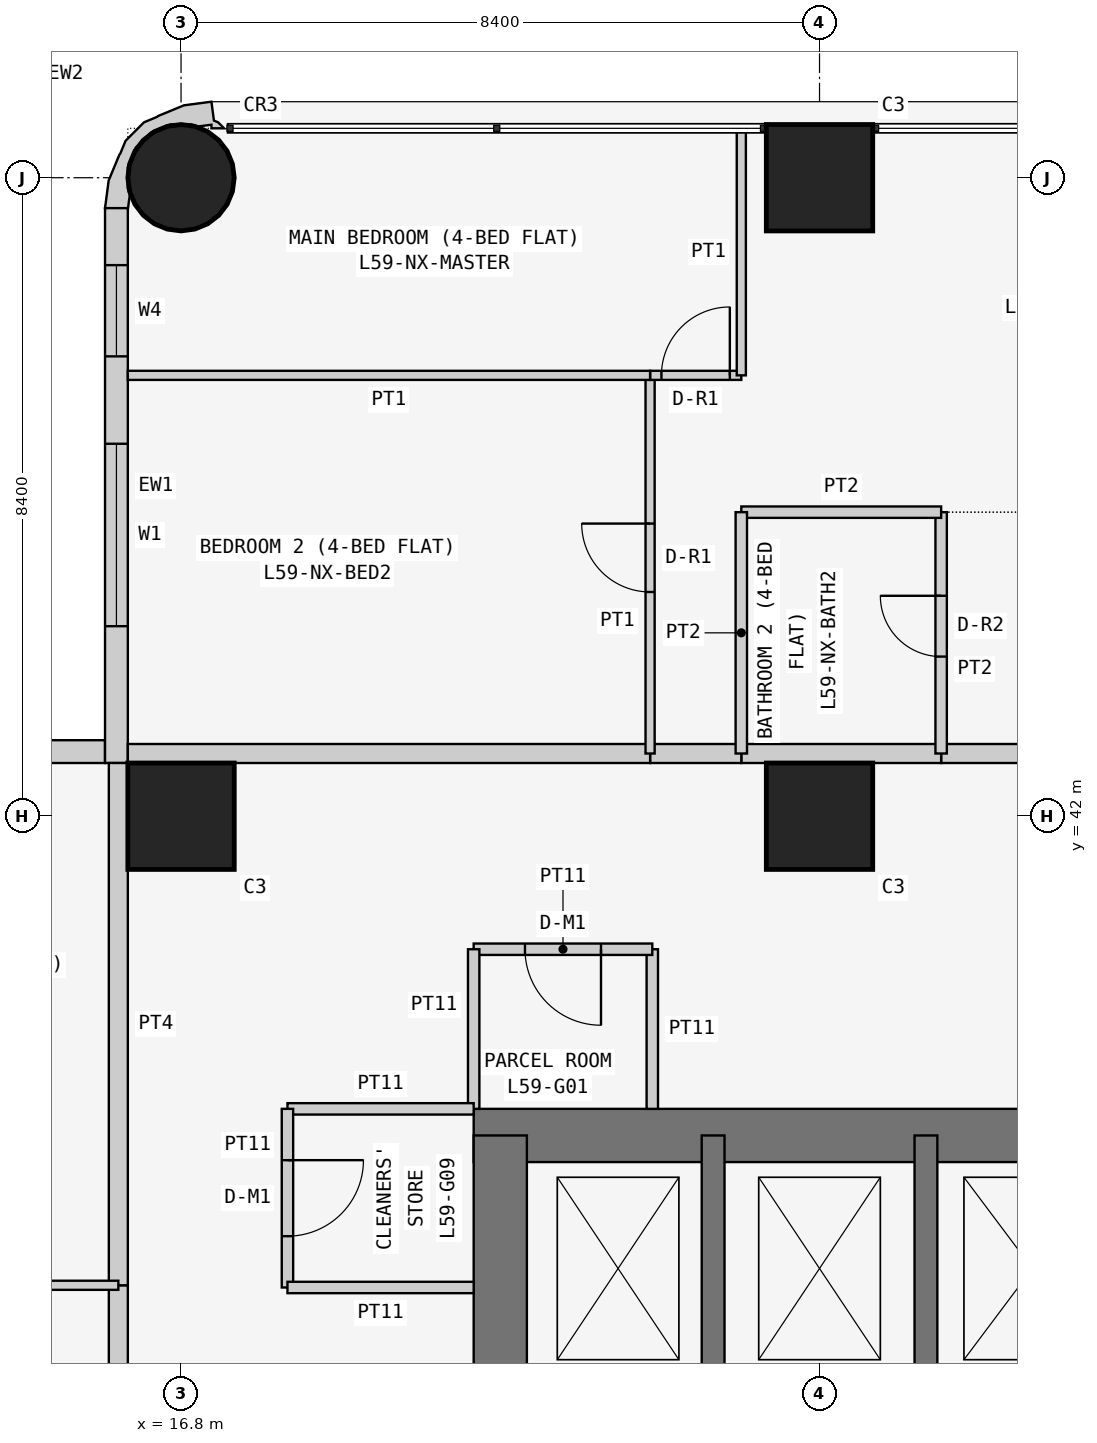
"""IFC4 building model, lengths in metres.
Left out: names, types, materials, properties, quantities, classifications, styles, units other than length and angle.
Written with IfcOpenShell. Run it as: python <this file> out.ifc"""

import sys

from ifc_helpers import new_model, si_unit, direction, frame, frame_2d, origin, origin_2d, place, context, subcontext, project, spatial, polyline, rectangle, circle, outline, extrude, element, fill, save


model = new_model("IFC4")
c1 = context("Model", 3, precision=1e-05, world=origin(), true_north=direction((0.0, 1.0)))
c2 = subcontext(c1, "Body", "Model", "MODEL_VIEW")
j1 = project(units=[si_unit("LENGTHUNIT", "METRE"), si_unit("PLANEANGLEUNIT", "RADIAN")], contexts=[c1])
p1 = place(None, origin())
s1 = spatial("IfcSite", under=j1, at=p1, CompositionType="ELEMENT")
p2 = place(p1, origin())
s2 = spatial("IfcBuilding", under=s1, at=p2, CompositionType="ELEMENT")
p3 = place(p2, frame((0.0, 0.0, 226.5)))
s3 = spatial("IfcBuildingStorey", under=s2, at=p3, CompositionType="ELEMENT", Elevation=226.5)
p4 = place(p3, frame((16.8, 42.0, 0.0), z_axis=(0.0, 0.0, 1.0), x_axis=(1.0, 0.0, 0.0)))
e1 = element("IfcColumn", 1, at=p4, inside=s3, PredefinedType="COLUMN", context=c2, shape_type="SweptSolid", body=[
    extrude(rectangle(XDim=1.4, YDim=1.4, at=origin_2d()), origin(), (0.0, 0.0, 1.0), 3.6),
])
p5 = place(p3, frame((16.8, 50.4, 0.0), z_axis=(0.0, 0.0, 1.0), x_axis=(1.0, 0.0, 0.0)))
e2 = element("IfcColumn", 2, at=p5, inside=s3, PredefinedType="COLUMN", context=c2, shape_type="SweptSolid", body=[
    extrude(circle(Radius=0.7, at=origin_2d()), origin(), (0.0, 0.0, 1.0), 3.6),
])
for number, where, z_axis, x_axis in (
    (3, (25.2, 42.0, 0.0), (0.0, 0.0, 1.0), (1.0, 0.0, 0.0)),
    (4, (25.2, 50.4, 0.0), (0.0, 0.0, 1.0), (1.0, 0.0, 0.0)),
):
    element("IfcColumn", number, at=place(p3, frame(where, z_axis=z_axis, x_axis=x_axis)), inside=s3, PredefinedType="COLUMN", context=c2, shape_type="SweptSolid", body=[
        extrude(rectangle(XDim=1.4, YDim=1.4, at=origin_2d()), origin(), (0.0, 0.0, 1.0), 3.6),
    ])
p6 = place(p3, frame((37.8, 37.8, 0.0), z_axis=(0.0, 0.0, 1.0), x_axis=(-1.0, 0.0, 0.0)))
e5 = element("IfcWall", 5, at=p6, inside=s3, PredefinedType="SHEAR", context=c2, shape_type="SweptSolid", body=[
    extrude(rectangle(XDim=17.15, YDim=0.7, at=frame_2d((8.575, 0.0))), origin(), (0.0, 0.0, 1.0), 3.6),
])
p7 = place(p3, frame((21.0, 37.8, 0.0), z_axis=(0.0, 0.0, 1.0), x_axis=(0.0, -1.0, 0.0)))
e6 = element("IfcWall", 6, at=p7, inside=s3, PredefinedType="SHEAR", context=c2, shape_type="SweptSolid", body=[
    extrude(rectangle(XDim=17.15, YDim=0.7, at=frame_2d((8.575, 0.0))), origin(), (0.0, 0.0, 1.0), 3.6),
])
p8 = place(p7, frame((5.4, 0.0, 0.0)))
e7 = element("IfcOpeningElement", 7, at=p8, cuts=e6, PredefinedType="OPENING", context=c2, shape_type="SweptSolid", body=[
    extrude(rectangle(XDim=1.2, YDim=2.1, at=frame_2d((0.6, 1.05))), frame((0.0, 0.36, 0.0), z_axis=(0.0, -1.0, 0.0), x_axis=(1.0, 0.0, 0.0)), (0.0, 0.0, 1.0), 0.72),
])
p9 = place(p3, frame((26.6, 21.0, 0.0), z_axis=(0.0, 0.0, 1.0), x_axis=(0.0, 1.0, 0.0)))
e8 = element("IfcWall", 8, at=p9, inside=s3, PredefinedType="SHEAR", context=c2, shape_type="SweptSolid", body=[
    extrude(rectangle(XDim=16.8, YDim=0.3, at=frame_2d((8.4, 0.0))), origin(), (0.0, 0.0, 1.0), 3.6),
])
p10 = place(p9, frame((10.4, 0.0, 0.0)))
e9 = element("IfcOpeningElement", 9, at=p10, cuts=e8, PredefinedType="OPENING", context=c2, shape_type="SweptSolid", body=[
    extrude(rectangle(XDim=1.2, YDim=2.1, at=frame_2d((0.6, 1.05))), frame((0.0, 0.16, 0.0), z_axis=(0.0, -1.0, 0.0), x_axis=(1.0, 0.0, 0.0)), (0.0, 0.0, 1.0), 0.32),
])
p11 = place(p3, frame((23.8, 34.6, 0.0), z_axis=(0.0, 0.0, 1.0), x_axis=(0.0, 1.0, 0.0)))
e10 = element("IfcWall", 10, at=p11, inside=s3, PredefinedType="SHEAR", context=c2, shape_type="SweptSolid", body=[
    extrude(rectangle(XDim=3.2, YDim=0.3, at=frame_2d((1.6, 0.0))), origin(), (0.0, 0.0, 1.0), 3.6),
])
p12 = place(p3, frame((15.8, 42.85, 0.0), z_axis=(0.0, 0.0, 1.0), x_axis=(-1.0, 0.0, 0.0)))
e11 = element("IfcWall", 11, at=p12, inside=s3, PredefinedType="SOLIDWALL", context=c2, shape_type="SweptSolid", body=[
    extrude(rectangle(XDim=15.4, YDim=0.3, at=frame_2d((7.7, 0.0))), origin(), (0.0, 0.0, 1.0), 3.45),
])
p13 = place(p12, frame((1.2, 0.0, 0.9)))
e12 = element("IfcOpeningElement", 12, at=p13, cuts=e11, PredefinedType="OPENING", context=c2, shape_type="SweptSolid", body=[
    extrude(rectangle(XDim=1.8, YDim=1.5, at=frame_2d((0.9, 0.75))), frame((0.0, 0.16, 0.0), z_axis=(0.0, -1.0, 0.0), x_axis=(1.0, 0.0, 0.0)), (0.0, 0.0, 1.0), 0.32),
])
p14 = place(p12, frame((4.95, 0.0, 1.5)))
e13 = element("IfcOpeningElement", 13, at=p14, cuts=e11, PredefinedType="OPENING", context=c2, shape_type="SweptSolid", body=[
    extrude(rectangle(XDim=0.9, YDim=0.7, at=frame_2d((0.45, 0.35))), frame((0.0, 0.16, 0.0), z_axis=(0.0, -1.0, 0.0), x_axis=(1.0, 0.0, 0.0)), (0.0, 0.0, 1.0), 0.32),
])
p15 = place(p12, frame((8.5, 0.0, 0.9)))
e14 = element("IfcOpeningElement", 14, at=p15, cuts=e11, PredefinedType="OPENING", context=c2, shape_type="SweptSolid", body=[
    extrude(rectangle(XDim=1.8, YDim=1.5, at=frame_2d((0.9, 0.75))), frame((0.0, 0.16, 0.0), z_axis=(0.0, -1.0, 0.0), x_axis=(1.0, 0.0, 0.0)), (0.0, 0.0, 1.0), 0.32),
])
p16 = place(p12, frame((12.5, 0.0, 0.0)))
e15 = element("IfcOpeningElement", 15, at=p16, cuts=e11, PredefinedType="OPENING", context=c2, shape_type="SweptSolid", body=[
    extrude(rectangle(XDim=0.9, YDim=2.4, at=frame_2d((0.45, 1.2))), frame((0.0, 0.16, 0.0), z_axis=(0.0, -1.0, 0.0), x_axis=(1.0, 0.0, 0.0)), (0.0, 0.0, 1.0), 0.32),
])
p17 = place(p12, frame((13.5, 0.0, 0.9)))
e16 = element("IfcOpeningElement", 16, at=p17, cuts=e11, PredefinedType="OPENING", context=c2, shape_type="SweptSolid", body=[
    extrude(rectangle(XDim=1.2, YDim=1.5, at=frame_2d((0.6, 0.75))), frame((0.0, 0.16, 0.0), z_axis=(0.0, -1.0, 0.0), x_axis=(1.0, 0.0, 0.0)), (0.0, 0.0, 1.0), 0.32),
])
p18 = place(p3, frame((15.95, 50.0, 0.0), z_axis=(0.0, 0.0, 1.0), x_axis=(0.0, -1.0, 0.0)))
e17 = element("IfcWall", 17, at=p18, inside=s3, PredefinedType="SOLIDWALL", context=c2, shape_type="SweptSolid", body=[
    extrude(rectangle(XDim=7.3, YDim=0.3, at=frame_2d((3.65, 0.0))), origin(), (0.0, 0.0, 1.0), 3.45),
])
p19 = place(p18, frame((3.1, 0.0, 0.9)))
e18 = element("IfcOpeningElement", 18, at=p19, cuts=e17, PredefinedType="OPENING", context=c2, shape_type="SweptSolid", body=[
    extrude(rectangle(XDim=2.4, YDim=1.5, at=frame_2d((1.2, 0.75))), frame((0.0, 0.16, 0.0), z_axis=(0.0, -1.0, 0.0), x_axis=(1.0, 0.0, 0.0)), (0.0, 0.0, 1.0), 0.32),
])
p20 = place(p18, frame((0.75, 0.0, 0.9)))
e19 = element("IfcOpeningElement", 19, at=p20, cuts=e17, PredefinedType="OPENING", context=c2, shape_type="SweptSolid", body=[
    extrude(rectangle(XDim=1.2, YDim=1.5, at=frame_2d((0.6, 0.75))), frame((0.0, 0.16, 0.0), z_axis=(0.0, -1.0, 0.0), x_axis=(1.0, 0.0, 0.0)), (0.0, 0.0, 1.0), 0.32),
])
p21 = place(p3, frame((17.312, 50.988, 0.0), z_axis=(0.0, 0.0, 1.0), x_axis=(-0.439933741929, 0.898030234854, 0.0)))
e20 = element("IfcWall", 20, at=p21, inside=s3, PredefinedType="SOLIDWALL", context=c2, shape_type="SweptSolid", body=[
    extrude(outline(polyline([(0.138, -0.039), (0.182, -0.0), (0.419, -0.08), (0.536, 0.266), (0.559, 0.631), (0.555, 0.651), (0.566, 0.836), (0.456, 1.159), (0.333, 1.298), (0.324, 1.316), (0.082, 1.591), (-0.222, 1.793), (-0.39, 1.541), (-0.372, 1.532), (-0.195, 1.414), (-0.12, 1.41), (0.131, 1.287), (0.315, 1.078), (0.406, 0.814), (0.388, 0.536), (0.265, 0.285), (0.209, 0.236), (0.148, 0.053), (0.105, 0.074), (0.032, -0.076), (0.138, -0.039)])), origin(), (0.0, 0.0, 1.0), 3.45),
])
p22 = place(p3, frame((23.0, 38.15, 0.0), z_axis=(0.0, 0.0, 1.0), x_axis=(0.0, 1.0, 0.0)))
e21 = element("IfcWall", 21, at=p22, inside=s3, PredefinedType="PARTITIONING", context=c2, shape_type="SweptSolid", body=[
    extrude(rectangle(XDim=2.1, YDim=0.15, at=frame_2d((1.05, 0.0))), origin(), (0.0, 0.0, 1.0), 3.45),
])
p23 = place(p3, frame((23.0, 40.25, 0.0), z_axis=(0.0, 0.0, 1.0), x_axis=(-1.0, 0.0, 0.0)))
e22 = element("IfcWall", 22, at=p23, inside=s3, PredefinedType="PARTITIONING", context=c2, shape_type="SweptSolid", body=[
    extrude(rectangle(XDim=2.35, YDim=0.15, at=frame_2d((1.175, 0.0))), origin(), (0.0, 0.0, 1.0), 3.45),
])
p24 = place(p23, frame((0.675, 0.0, 0.0)))
e23 = element("IfcOpeningElement", 23, at=p24, cuts=e22, PredefinedType="OPENING", context=c2, shape_type="SweptSolid", body=[
    extrude(rectangle(XDim=1.0, YDim=2.1, at=frame_2d((0.5, 1.05))), frame((0.0, 0.085, 0.0), z_axis=(0.0, -1.0, 0.0), x_axis=(1.0, 0.0, 0.0)), (0.0, 0.0, 1.0), 0.17),
])
p25 = place(p3, frame((20.65, 40.25, 0.0), z_axis=(0.0, 0.0, 1.0), x_axis=(0.0, -1.0, 0.0)))
e24 = element("IfcWall", 24, at=p25, inside=s3, PredefinedType="PARTITIONING", context=c2, shape_type="SweptSolid", body=[
    extrude(rectangle(XDim=2.1, YDim=0.15, at=frame_2d((1.05, 0.0))), origin(), (0.0, 0.0, 1.0), 3.45),
])
p26 = place(p3, frame((20.65, 38.15, 0.0), z_axis=(0.0, 0.0, 1.0), x_axis=(-1.0, 0.0, 0.0)))
e25 = element("IfcWall", 25, at=p26, inside=s3, PredefinedType="PARTITIONING", context=c2, shape_type="SweptSolid", body=[
    extrude(rectangle(XDim=2.45, YDim=0.15, at=frame_2d((1.225, 0.0))), origin(), (0.0, 0.0, 1.0), 3.45),
])
p27 = place(p3, frame((18.2, 38.15, 0.0), z_axis=(0.0, 0.0, 1.0), x_axis=(0.0, -1.0, 0.0)))
e26 = element("IfcWall", 26, at=p27, inside=s3, PredefinedType="PARTITIONING", context=c2, shape_type="SweptSolid", body=[
    extrude(rectangle(XDim=2.35, YDim=0.15, at=frame_2d((1.175, 0.0))), origin(), (0.0, 0.0, 1.0), 3.45),
])
p28 = place(p27, frame((0.675, 0.0, 0.0)))
e27 = element("IfcOpeningElement", 27, at=p28, cuts=e26, PredefinedType="OPENING", context=c2, shape_type="SweptSolid", body=[
    extrude(rectangle(XDim=1.0, YDim=2.1, at=frame_2d((0.5, 1.05))), frame((0.0, 0.085, 0.0), z_axis=(0.0, -1.0, 0.0), x_axis=(1.0, 0.0, 0.0)), (0.0, 0.0, 1.0), 0.17),
])
p29 = place(p3, frame((18.2, 35.8, 0.0), z_axis=(0.0, 0.0, 1.0), x_axis=(1.0, 0.0, 0.0)))
e28 = element("IfcWall", 28, at=p29, inside=s3, PredefinedType="PARTITIONING", context=c2, shape_type="SweptSolid", body=[
    extrude(rectangle(XDim=2.45, YDim=0.15, at=frame_2d((1.225, 0.0))), origin(), (0.0, 0.0, 1.0), 3.45),
])
p30 = place(p3, frame((26.8, 42.825, 0.0), z_axis=(0.0, 0.0, 1.0), x_axis=(1.0, 0.0, 0.0)))
e29 = element("IfcWall", 29, at=p30, inside=s3, PredefinedType="PARTITIONING", context=c2, shape_type="SweptSolid", body=[
    extrude(rectangle(XDim=5.2, YDim=0.25, at=frame_2d((2.6, 0.0))), origin(), (0.0, 0.0, 1.0), 3.45),
])
p31 = place(p30, frame((2.1, 0.0, 0.0)))
e30 = element("IfcOpeningElement", 30, at=p31, cuts=e29, PredefinedType="OPENING", context=c2, shape_type="SweptSolid", body=[
    extrude(rectangle(XDim=1.0, YDim=2.1, at=frame_2d((0.5, 1.05))), frame((0.0, 0.135, 0.0), z_axis=(0.0, -1.0, 0.0), x_axis=(1.0, 0.0, 0.0)), (0.0, 0.0, 1.0), 0.27),
])
p32 = place(p3, frame((24.171, 42.825, 0.0), z_axis=(0.0, 0.0, 1.0), x_axis=(1.0, 0.0, 0.0)))
e31 = element("IfcWall", 31, at=p32, inside=s3, PredefinedType="PARTITIONING", context=c2, shape_type="SweptSolid", body=[
    extrude(rectangle(XDim=2.629, YDim=0.25, at=frame_2d((1.314, 0.0))), origin(), (0.0, 0.0, 1.0), 3.45),
])
p33 = place(p3, frame((22.971, 42.825, 0.0), z_axis=(0.0, 0.0, 1.0), x_axis=(1.0, 0.0, 0.0)))
e32 = element("IfcWall", 32, at=p33, inside=s3, PredefinedType="PARTITIONING", context=c2, shape_type="SweptSolid", body=[
    extrude(rectangle(XDim=1.2, YDim=0.25, at=frame_2d((0.6, 0.0))), origin(), (0.0, 0.0, 1.0), 3.45),
])
p34 = place(p3, frame((16.1, 42.825, 0.0), z_axis=(0.0, 0.0, 1.0), x_axis=(1.0, 0.0, 0.0)))
e33 = element("IfcWall", 33, at=p34, inside=s3, PredefinedType="PARTITIONING", context=c2, shape_type="SweptSolid", body=[
    extrude(rectangle(XDim=6.871, YDim=0.25, at=frame_2d((3.436, 0.0))), origin(), (0.0, 0.0, 1.0), 3.45),
])
p35 = place(p3, frame((15.975, 34.629, 0.0), z_axis=(0.0, 0.0, 1.0), x_axis=(0.0, 1.0, 0.0)))
e34 = element("IfcWall", 34, at=p35, inside=s3, PredefinedType="PARTITIONING", context=c2, shape_type="SweptSolid", body=[
    extrude(rectangle(XDim=1.2, YDim=0.25, at=frame_2d((0.6, 0.0))), origin(), (0.0, 0.0, 1.0), 3.45),
])
p36 = place(p3, frame((15.975, 35.829, 0.0), z_axis=(0.0, 0.0, 1.0), x_axis=(0.0, 1.0, 0.0)))
e35 = element("IfcWall", 35, at=p36, inside=s3, PredefinedType="PARTITIONING", context=c2, shape_type="SweptSolid", body=[
    extrude(rectangle(XDim=6.871, YDim=0.25, at=frame_2d((3.436, 0.0))), origin(), (0.0, 0.0, 1.0), 3.45),
])
p37 = place(p3, frame((26.8, 46.0, 0.0), z_axis=(0.0, 0.0, 1.0), x_axis=(0.0, -1.0, 0.0)))
e36 = element("IfcWall", 36, at=p37, inside=s3, PredefinedType="PARTITIONING", context=c2, shape_type="SweptSolid", body=[
    extrude(rectangle(XDim=3.175, YDim=0.15, at=frame_2d((1.587, 0.0))), origin(), (0.0, 0.0, 1.0), 3.45),
])
p38 = place(p37, frame((1.1, 0.0, 0.0)))
e37 = element("IfcOpeningElement", 37, at=p38, cuts=e36, PredefinedType="OPENING", context=c2, shape_type="SweptSolid", body=[
    extrude(rectangle(XDim=0.8, YDim=2.1, at=frame_2d((0.4, 1.05))), frame((0.0, 0.085, 0.0), z_axis=(0.0, -1.0, 0.0), x_axis=(1.0, 0.0, 0.0)), (0.0, 0.0, 1.0), 0.17),
])
p39 = place(p3, frame((26.8, 46.0, 0.0), z_axis=(0.0, 0.0, 1.0), x_axis=(-1.0, 0.0, 0.0)))
e38 = element("IfcWall", 38, at=p39, inside=s3, PredefinedType="PARTITIONING", context=c2, shape_type="SweptSolid", body=[
    extrude(rectangle(XDim=2.629, YDim=0.15, at=frame_2d((1.314, 0.0))), origin(), (0.0, 0.0, 1.0), 3.45),
])
p40 = place(p3, frame((24.171, 46.0, 0.0), z_axis=(0.0, 0.0, 1.0), x_axis=(0.0, -1.0, 0.0)))
e39 = element("IfcWall", 39, at=p40, inside=s3, PredefinedType="PARTITIONING", context=c2, shape_type="SweptSolid", body=[
    extrude(rectangle(XDim=3.175, YDim=0.15, at=frame_2d((1.587, 0.0))), origin(), (0.0, 0.0, 1.0), 3.45),
])
p41 = place(p3, frame((22.971, 42.825, 0.0), z_axis=(0.0, 0.0, 1.0), x_axis=(0.0, 1.0, 0.0)))
e40 = element("IfcWall", 40, at=p41, inside=s3, PredefinedType="PARTITIONING", context=c2, shape_type="SweptSolid", body=[
    extrude(rectangle(XDim=4.975, YDim=0.12, at=frame_2d((2.488, 0.0))), origin(), (0.0, 0.0, 1.0), 3.45),
])
p42 = place(p41, frame((2.125, 0.0, 0.0)))
e41 = element("IfcOpeningElement", 41, at=p42, cuts=e40, PredefinedType="OPENING", context=c2, shape_type="SweptSolid", body=[
    extrude(rectangle(XDim=0.9, YDim=2.1, at=frame_2d((0.45, 1.05))), frame((0.0, 0.07, 0.0), z_axis=(0.0, -1.0, 0.0), x_axis=(1.0, 0.0, 0.0)), (0.0, 0.0, 1.0), 0.14),
])
p43 = place(p3, frame((22.971, 47.8, 0.0), z_axis=(0.0, 0.0, 1.0), x_axis=(1.0, 0.0, 0.0)))
e42 = element("IfcWall", 42, at=p43, inside=s3, PredefinedType="PARTITIONING", context=c2, shape_type="SweptSolid", body=[
    extrude(rectangle(XDim=1.2, YDim=0.12, at=frame_2d((0.6, 0.0))), origin(), (0.0, 0.0, 1.0), 3.45),
])
p44 = place(p43, frame((0.149, 0.0, 0.0)))
e43 = element("IfcOpeningElement", 43, at=p44, cuts=e42, PredefinedType="OPENING", context=c2, shape_type="SweptSolid", body=[
    extrude(rectangle(XDim=0.9, YDim=2.1, at=frame_2d((0.45, 1.05))), frame((0.0, 0.07, 0.0), z_axis=(0.0, -1.0, 0.0), x_axis=(1.0, 0.0, 0.0)), (0.0, 0.0, 1.0), 0.14),
])
p45 = place(p3, frame((24.171, 47.8, 0.0), z_axis=(0.0, 0.0, 1.0), x_axis=(0.0, 1.0, 0.0)))
e44 = element("IfcWall", 44, at=p45, inside=s3, PredefinedType="PARTITIONING", context=c2, shape_type="SweptSolid", body=[
    extrude(rectangle(XDim=3.25, YDim=0.12, at=frame_2d((1.625, 0.0))), origin(), (0.0, 0.0, 1.0), 3.45),
])
p46 = place(p3, frame((22.971, 47.8, 0.0), z_axis=(0.0, 0.0, 1.0), x_axis=(-1.0, 0.0, 0.0)))
e45 = element("IfcWall", 45, at=p46, inside=s3, PredefinedType="PARTITIONING", context=c2, shape_type="SweptSolid", body=[
    extrude(rectangle(XDim=6.871, YDim=0.12, at=frame_2d((3.436, 0.0))), origin(), (0.0, 0.0, 1.0), 3.45),
])
p47 = place(p3, frame((11.2, 35.829, 0.0), z_axis=(0.0, 0.0, 1.0), x_axis=(1.0, 0.0, 0.0)))
e46 = element("IfcWall", 46, at=p47, inside=s3, PredefinedType="PARTITIONING", context=c2, shape_type="SweptSolid", body=[
    extrude(rectangle(XDim=4.775, YDim=0.12, at=frame_2d((2.388, 0.0))), origin(), (0.0, 0.0, 1.0), 3.45),
])
p48 = place(p47, frame((1.85, 0.0, 0.0)))
e47 = element("IfcOpeningElement", 47, at=p48, cuts=e46, PredefinedType="OPENING", context=c2, shape_type="SweptSolid", body=[
    extrude(rectangle(XDim=0.9, YDim=2.1, at=frame_2d((0.45, 1.05))), frame((0.0, 0.07, 0.0), z_axis=(0.0, -1.0, 0.0), x_axis=(1.0, 0.0, 0.0)), (0.0, 0.0, 1.0), 0.14),
])
p49 = place(p19, origin())
e48 = element("IfcWindow", 48, at=p49, inside=s3, PartitioningType="SINGLE_PANEL", PredefinedType="WINDOW", context=c2, shape_type="SweptSolid", body=[
    extrude(rectangle(XDim=2.4, YDim=1.5, at=frame_2d((1.2, 0.75))), frame((0.0, 0.03, 0.0), z_axis=(0.0, -1.0, 0.0), x_axis=(1.0, 0.0, 0.0)), (0.0, 0.0, 1.0), 0.06),
])
fill(e18, e48)
p50 = place(p20, origin())
e49 = element("IfcWindow", 49, at=p50, inside=s3, PartitioningType="SINGLE_PANEL", PredefinedType="WINDOW", context=c2, shape_type="SweptSolid", body=[
    extrude(rectangle(XDim=1.2, YDim=1.5, at=frame_2d((0.6, 0.75))), frame((0.0, 0.03, 0.0), z_axis=(0.0, -1.0, 0.0), x_axis=(1.0, 0.0, 0.0)), (0.0, 0.0, 1.0), 0.06),
])
fill(e19, e49)
p51 = place(p24, origin())
e50 = element("IfcDoor", 50, at=p51, inside=s3, OperationType="SINGLE_SWING_LEFT", PredefinedType="DOOR", context=c2, shape_type="SweptSolid", body=[
    extrude(rectangle(XDim=1.0, YDim=2.1, at=frame_2d((0.5, 1.05))), frame((0.0, 0.025, 0.0), z_axis=(0.0, -1.0, 0.0), x_axis=(1.0, 0.0, 0.0)), (0.0, 0.0, 1.0), 0.05),
])
fill(e23, e50)
p52 = place(p28, origin())
e51 = element("IfcDoor", 51, at=p52, inside=s3, OperationType="SINGLE_SWING_LEFT", PredefinedType="DOOR", context=c2, shape_type="SweptSolid", body=[
    extrude(rectangle(XDim=1.0, YDim=2.1, at=frame_2d((0.5, 1.05))), frame((0.0, 0.025, 0.0), z_axis=(0.0, -1.0, 0.0), x_axis=(1.0, 0.0, 0.0)), (0.0, 0.0, 1.0), 0.05),
])
fill(e27, e51)
p53 = place(p38, frame((0.8, 0.0, 0.0), z_axis=(0.0, 0.0, 1.0), x_axis=(-1.0, 0.0, 0.0)))
e52 = element("IfcDoor", 52, at=p53, inside=s3, OperationType="SINGLE_SWING_RIGHT", PredefinedType="DOOR", context=c2, shape_type="SweptSolid", body=[
    extrude(rectangle(XDim=0.8, YDim=2.1, at=frame_2d((0.4, 1.05))), frame((0.0, 0.025, 0.0), z_axis=(0.0, -1.0, 0.0), x_axis=(1.0, 0.0, 0.0)), (0.0, 0.0, 1.0), 0.05),
])
fill(e37, e52)
p54 = place(p42, origin())
e53 = element("IfcDoor", 53, at=p54, inside=s3, OperationType="SINGLE_SWING_RIGHT", PredefinedType="DOOR", context=c2, shape_type="SweptSolid", body=[
    extrude(rectangle(XDim=0.9, YDim=2.1, at=frame_2d((0.45, 1.05))), frame((0.0, 0.025, 0.0), z_axis=(0.0, -1.0, 0.0), x_axis=(1.0, 0.0, 0.0)), (0.0, 0.0, 1.0), 0.05),
])
fill(e41, e53)
p55 = place(p44, origin())
e54 = element("IfcDoor", 54, at=p55, inside=s3, OperationType="SINGLE_SWING_RIGHT", PredefinedType="DOOR", context=c2, shape_type="SweptSolid", body=[
    extrude(rectangle(XDim=0.9, YDim=2.1, at=frame_2d((0.45, 1.05))), frame((0.0, 0.025, 0.0), z_axis=(0.0, -1.0, 0.0), x_axis=(1.0, 0.0, 0.0)), (0.0, 0.0, 1.0), 0.05),
])
fill(e43, e54)
save(model, sys.argv[1])
